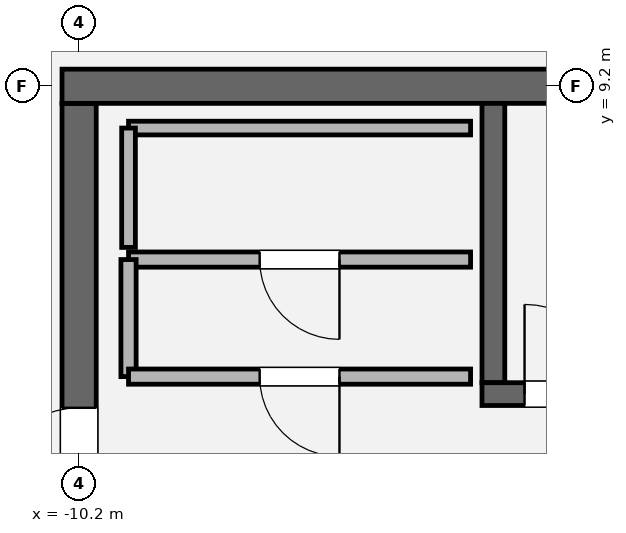
"""IFC4 building model, lengths in metres.
Left out: names, types, materials, properties, quantities, classifications, styles, units other than length and angle.
Written with IfcOpenShell. Run it as: python <this file> out.ifc"""

import sys

from ifc_helpers import new_model, si_unit, direction, frame, frame_2d, origin, place, context, subcontext, project, spatial, rectangle, extrude, element, fill, save


model = new_model("IFC4")
c1 = context("Model", 3, precision=1e-05, world=origin(), true_north=direction((0.0, 1.0)))
c2 = subcontext(c1, "Body", "Model", "MODEL_VIEW")
j1 = project(units=[si_unit("LENGTHUNIT", "METRE"), si_unit("PLANEANGLEUNIT", "RADIAN")], contexts=[c1])
p1 = place(None, origin())
s1 = spatial("IfcSite", under=j1, at=p1, CompositionType="ELEMENT")
p2 = place(p1, origin())
s2 = spatial("IfcBuilding", under=s1, at=p2, CompositionType="ELEMENT")
p3 = place(p2, frame((0.0, 0.0, 317.4)))
s3 = spatial("IfcBuildingStorey", under=s2, at=p3, CompositionType="ELEMENT", Elevation=317.4)
p4 = place(p3, frame((-10.2, -8.975, 0.0), z_axis=(0.0, 0.0, 1.0), x_axis=(0.0, 1.0, 0.0)))
e1 = element("IfcWall", 1, at=p4, inside=s3, PredefinedType="SHEAR", context=c2, shape_type="SweptSolid", body=[
    extrude(rectangle(XDim=17.95, YDim=0.45, at=frame_2d((8.975, 0.0))), origin(), (0.0, 0.0, 1.0), 4.2),
])
p5 = place(p4, frame((12.765, 0.0, 0.0)))
e2 = element("IfcOpeningElement", 2, at=p5, cuts=e1, PredefinedType="OPENING", context=c2, shape_type="SweptSolid", body=[
    extrude(rectangle(XDim=1.18, YDim=2.2, at=frame_2d((0.59, 1.1))), frame((0.0, 0.235, 0.0), z_axis=(0.0, -1.0, 0.0), x_axis=(1.0, 0.0, 0.0)), (0.0, 0.0, 1.0), 0.47),
])
p6 = place(p3, frame((-10.425, 9.2, 0.0), z_axis=(0.0, 0.0, 1.0), x_axis=(1.0, 0.0, 0.0)))
e3 = element("IfcWall", 3, at=p6, inside=s3, PredefinedType="SHEAR", context=c2, shape_type="SweptSolid", body=[
    extrude(rectangle(XDim=20.85, YDim=0.45, at=frame_2d((10.425, 0.0))), origin(), (0.0, 0.0, 1.0), 4.2),
])
p7 = place(p3, frame((-4.75, 5.3, 0.0), z_axis=(0.0, 0.0, 1.0), x_axis=(0.0, 1.0, 0.0)))
e4 = element("IfcWall", 4, at=p7, inside=s3, PredefinedType="SOLIDWALL", context=c2, shape_type="SweptSolid", body=[
    extrude(rectangle(XDim=3.675, YDim=0.3, at=frame_2d((1.837, 0.0))), origin(), (0.0, 0.0, 1.0), 4.2),
])
p8 = place(p3, frame((-4.9, 5.15, 0.0), z_axis=(0.0, 0.0, 1.0), x_axis=(1.0, 0.0, 0.0)))
e5 = element("IfcWall", 5, at=p8, inside=s3, PredefinedType="SOLIDWALL", context=c2, shape_type="SweptSolid", body=[
    extrude(rectangle(XDim=9.8, YDim=0.3, at=frame_2d((4.9, 0.0))), origin(), (0.0, 0.0, 1.0), 4.2),
])
p9 = place(p8, frame((0.56, 0.0, 0.0)))
e6 = element("IfcOpeningElement", 6, at=p9, cuts=e5, PredefinedType="OPENING", context=c2, shape_type="SweptSolid", body=[
    extrude(rectangle(XDim=1.18, YDim=2.2, at=frame_2d((0.59, 1.1))), frame((0.0, 0.16, 0.0), z_axis=(0.0, -1.0, 0.0), x_axis=(1.0, 0.0, 0.0)), (0.0, 0.0, 1.0), 0.32),
])
p10 = place(p3, frame((-5.05, 6.92, 0.0), z_axis=(0.0, 0.0, 1.0), x_axis=(-1.0, 0.0, 0.0)))
e7 = element("IfcWall", 7, at=p10, inside=s3, PredefinedType="SOLIDWALL", context=c2, shape_type="SweptSolid", body=[
    extrude(rectangle(XDim=4.5, YDim=0.2, at=frame_2d((2.25, 0.0))), origin(), (0.0, 0.0, 1.0), 4.0),
])
p11 = place(p10, frame((1.725, 0.0, 0.0)))
e8 = element("IfcOpeningElement", 8, at=p11, cuts=e7, PredefinedType="OPENING", context=c2, shape_type="SweptSolid", body=[
    extrude(rectangle(XDim=1.05, YDim=2.2, at=frame_2d((0.525, 1.1))), frame((0.0, 0.11, 0.0), z_axis=(0.0, -1.0, 0.0), x_axis=(1.0, 0.0, 0.0)), (0.0, 0.0, 1.0), 0.22),
])
p12 = place(p3, frame((-9.55, 6.92, 0.0), z_axis=(0.0, 0.0, 1.0), x_axis=(0.0, -1.0, 0.0)))
e9 = element("IfcWall", 9, at=p12, inside=s3, PredefinedType="SOLIDWALL", context=c2, shape_type="SweptSolid", body=[
    extrude(rectangle(XDim=1.54, YDim=0.2, at=frame_2d((0.77, 0.0))), origin(), (0.0, 0.0, 1.0), 4.0),
])
p13 = place(p3, frame((-9.55, 5.38, 0.0), z_axis=(0.0, 0.0, 1.0), x_axis=(1.0, 0.0, 0.0)))
e10 = element("IfcWall", 10, at=p13, inside=s3, PredefinedType="SOLIDWALL", context=c2, shape_type="SweptSolid", body=[
    extrude(rectangle(XDim=4.5, YDim=0.2, at=frame_2d((2.25, 0.0))), origin(), (0.0, 0.0, 1.0), 4.0),
])
p14 = place(p13, frame((1.725, 0.0, 0.0)))
e11 = element("IfcOpeningElement", 11, at=p14, cuts=e10, PredefinedType="OPENING", context=c2, shape_type="SweptSolid", body=[
    extrude(rectangle(XDim=1.05, YDim=2.2, at=frame_2d((0.525, 1.1))), frame((0.0, 0.11, 0.0), z_axis=(0.0, -1.0, 0.0), x_axis=(1.0, 0.0, 0.0)), (0.0, 0.0, 1.0), 0.22),
])
p15 = place(p3, frame((-5.05, 8.65, 0.0), z_axis=(0.0, 0.0, 1.0), x_axis=(-1.0, 0.0, 0.0)))
e12 = element("IfcWall", 12, at=p15, inside=s3, PredefinedType="PARTITIONING", context=c2, shape_type="SweptSolid", body=[
    extrude(rectangle(XDim=4.5, YDim=0.18, at=frame_2d((2.25, 0.0))), origin(), (0.0, 0.0, 1.0), 4.0),
])
p16 = place(p3, frame((-9.55, 8.65, 0.0), z_axis=(0.0, 0.0, 1.0), x_axis=(0.0, -1.0, 0.0)))
e13 = element("IfcWall", 13, at=p16, inside=s3, PredefinedType="PARTITIONING", context=c2, shape_type="SweptSolid", body=[
    extrude(rectangle(XDim=1.57, YDim=0.18, at=frame_2d((0.785, 0.0))), origin(), (0.0, 0.0, 1.0), 4.0),
])
p17 = place(p9, origin())
e14 = element("IfcDoor", 14, at=p17, inside=s3, OperationType="SINGLE_SWING_LEFT", PredefinedType="DOOR", context=c2, shape_type="SweptSolid", body=[
    extrude(rectangle(XDim=1.18, YDim=2.2, at=frame_2d((0.59, 1.1))), frame((0.0, 0.025, 0.0), z_axis=(0.0, -1.0, 0.0), x_axis=(1.0, 0.0, 0.0)), (0.0, 0.0, 1.0), 0.05),
])
fill(e6, e14)
p18 = place(p5, origin())
e15 = element("IfcDoor", 15, at=p18, inside=s3, OperationType="SINGLE_SWING_LEFT", PredefinedType="DOOR", context=c2, shape_type="SweptSolid", body=[
    extrude(rectangle(XDim=1.18, YDim=2.2, at=frame_2d((0.59, 1.1))), frame((0.0, 0.025, 0.0), z_axis=(0.0, -1.0, 0.0), x_axis=(1.0, 0.0, 0.0)), (0.0, 0.0, 1.0), 0.05),
])
fill(e2, e15)
p19 = place(p14, origin())
e16 = element("IfcDoor", 16, at=p19, inside=s3, OperationType="SINGLE_SWING_RIGHT", PredefinedType="DOOR", context=c2, shape_type="SweptSolid", body=[
    extrude(rectangle(XDim=1.05, YDim=2.2, at=frame_2d((0.525, 1.1))), frame((0.0, 0.025, 0.0), z_axis=(0.0, -1.0, 0.0), x_axis=(1.0, 0.0, 0.0)), (0.0, 0.0, 1.0), 0.05),
])
fill(e11, e16)
p20 = place(p11, origin())
e17 = element("IfcDoor", 17, at=p20, inside=s3, OperationType="SINGLE_SWING_LEFT", PredefinedType="DOOR", context=c2, shape_type="SweptSolid", body=[
    extrude(rectangle(XDim=1.05, YDim=2.2, at=frame_2d((0.525, 1.1))), frame((0.0, 0.025, 0.0), z_axis=(0.0, -1.0, 0.0), x_axis=(1.0, 0.0, 0.0)), (0.0, 0.0, 1.0), 0.05),
])
fill(e8, e17)
save(model, sys.argv[1])
